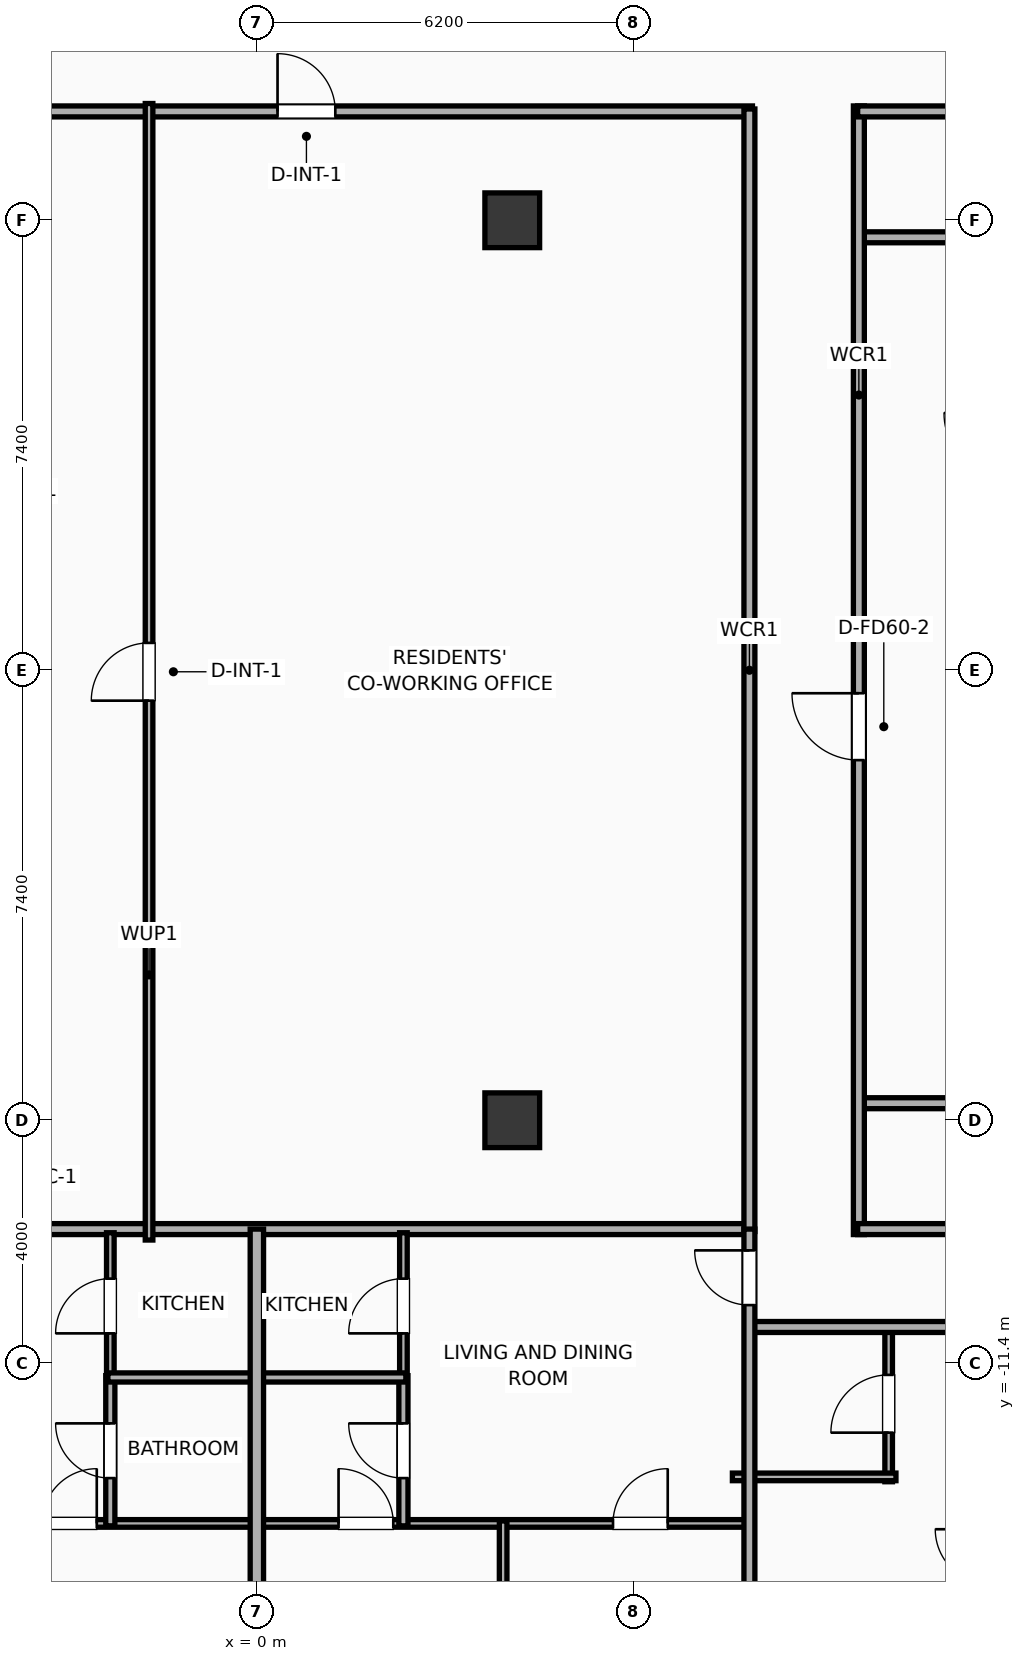
"""IFC4 building model, lengths in metres.
Left out: names, types, materials, properties, quantities, classifications, styles, units other than length and angle.
Written with IfcOpenShell. Run it as: python <this file> out.ifc"""

import sys

from ifc_helpers import new_model, si_unit, direction, frame, frame_2d, origin, origin_2d, place, context, subcontext, project, spatial, rectangle, extrude, element, fill, save


model = new_model("IFC4")
c1 = context("Model", 3, precision=1e-05, world=origin(), true_north=direction((0.0, 1.0)))
c2 = subcontext(c1, "Body", "Model", "MODEL_VIEW")
j1 = project(units=[si_unit("LENGTHUNIT", "METRE"), si_unit("PLANEANGLEUNIT", "RADIAN")], contexts=[c1])
p1 = place(None, origin())
s1 = spatial("IfcSite", under=j1, at=p1, CompositionType="ELEMENT")
p2 = place(p1, origin())
s2 = spatial("IfcBuilding", under=s1, at=p2, CompositionType="ELEMENT")
p3 = place(p2, frame((0.0, 0.0, 223.6)))
s3 = spatial("IfcBuildingStorey", under=s2, at=p3, CompositionType="ELEMENT", Elevation=223.6)
for number, where, z_axis, x_axis in (
    (1, (4.2, -7.4, 0.0), (0.0, 0.0, 1.0), (1.0, 0.0, 0.0)),
    (2, (4.2, 7.4, 0.0), (0.0, 0.0, 1.0), (1.0, 0.0, 0.0)),
):
    element("IfcColumn", number, at=place(p3, frame(where, z_axis=z_axis, x_axis=x_axis)), inside=s3, PredefinedType="COLUMN", context=c2, shape_type="SweptSolid", body=[
        extrude(rectangle(XDim=0.9, YDim=0.9, at=origin_2d()), origin(), (0.0, 0.0, 1.0), 3.9),
    ])
for number, where, z_axis, x_axis in (
    (3, (9.88, 7.12, 0.0), (0.0, 0.0, 1.0), (1.0, 0.0, 0.0)),
    (4, (9.88, -7.12, 0.0), (0.0, 0.0, 1.0), (1.0, 0.0, 0.0)),
):
    element("IfcWall", number, at=place(p3, frame(where, z_axis=z_axis, x_axis=x_axis)), inside=s3, PredefinedType="PARTITIONING", context=c2, shape_type="SweptSolid", body=[
        extrude(rectangle(XDim=2.27, YDim=0.18, at=frame_2d((1.135, 0.0))), origin(), (0.0, 0.0, 1.0), 3.65),
    ])
p4 = place(p3, frame((9.9, -9.28, 0.0), z_axis=(0.0, 0.0, 1.0), x_axis=(0.0, 1.0, 0.0)))
e5 = element("IfcWall", 5, at=p4, inside=s3, PredefinedType="PARTITIONING", context=c2, shape_type="SweptSolid", body=[
    extrude(rectangle(XDim=18.56, YDim=0.18, at=frame_2d((9.28, 0.0))), origin(), (0.0, 0.0, 1.0), 3.65),
])
p5 = place(p4, frame((7.802, 0.0, 0.0)))
e6 = element("IfcOpeningElement", 6, at=p5, cuts=e5, PredefinedType="OPENING", context=c2, shape_type="SweptSolid", body=[
    extrude(rectangle(XDim=1.1, YDim=2.05, at=frame_2d((0.55, 1.025))), frame((0.0, 0.1, 0.0), z_axis=(0.0, -1.0, 0.0), x_axis=(1.0, 0.0, 0.0)), (0.0, 0.0, 1.0), 0.2),
])
p6 = place(p3, frame((9.88, 9.19, 0.0), z_axis=(0.0, 0.0, 1.0), x_axis=(1.0, 0.0, 0.0)))
e7 = element("IfcWall", 7, at=p6, inside=s3, PredefinedType="PARTITIONING", context=c2, shape_type="SweptSolid", body=[
    extrude(rectangle(XDim=20.35, YDim=0.18, at=frame_2d((10.175, 0.0))), origin(), (0.0, 0.0, 1.0), 3.65),
])
p7 = place(p6, frame((15.149, 0.0, 0.0)))
e8 = element("IfcOpeningElement", 8, at=p7, cuts=e7, PredefinedType="OPENING", context=c2, shape_type="SweptSolid", body=[
    extrude(rectangle(XDim=1.15, YDim=2.05, at=frame_2d((0.575, 1.025))), frame((0.0, 0.1, 0.0), z_axis=(0.0, -1.0, 0.0), x_axis=(1.0, 0.0, 0.0)), (0.0, 0.0, 1.0), 0.2),
])
p8 = place(p3, frame((9.88, -9.19, 0.0), z_axis=(0.0, 0.0, 1.0), x_axis=(1.0, 0.0, 0.0)))
e9 = element("IfcWall", 9, at=p8, inside=s3, PredefinedType="PARTITIONING", context=c2, shape_type="SweptSolid", body=[
    extrude(rectangle(XDim=20.35, YDim=0.18, at=frame_2d((10.175, 0.0))), origin(), (0.0, 0.0, 1.0), 3.65),
])
p9 = place(p3, frame((-8.15, 9.19, 0.0), z_axis=(0.0, 0.0, 1.0), x_axis=(1.0, 0.0, 0.0)))
e10 = element("IfcWall", 10, at=p9, inside=s3, PredefinedType="PARTITIONING", context=c2, shape_type="SweptSolid", body=[
    extrude(rectangle(XDim=16.3, YDim=0.18, at=frame_2d((8.15, 0.0))), origin(), (0.0, 0.0, 1.0), 3.65),
])
p10 = place(p9, frame((8.49, 0.0, 0.0)))
e11 = element("IfcOpeningElement", 11, at=p10, cuts=e10, PredefinedType="OPENING", context=c2, shape_type="SweptSolid", body=[
    extrude(rectangle(XDim=0.95, YDim=2.05, at=frame_2d((0.475, 1.025))), frame((0.0, 0.1, 0.0), z_axis=(0.0, -1.0, 0.0), x_axis=(1.0, 0.0, 0.0)), (0.0, 0.0, 1.0), 0.2),
])
p11 = place(p3, frame((-8.15, -9.19, 0.0), z_axis=(0.0, 0.0, 1.0), x_axis=(1.0, 0.0, 0.0)))
e12 = element("IfcWall", 12, at=p11, inside=s3, PredefinedType="PARTITIONING", context=c2, shape_type="SweptSolid", body=[
    extrude(rectangle(XDim=16.3, YDim=0.18, at=frame_2d((8.15, 0.0))), origin(), (0.0, 0.0, 1.0), 3.65),
])
p12 = place(p3, frame((8.1, -9.23, 0.0), z_axis=(0.0, 0.0, 1.0), x_axis=(0.0, 1.0, 0.0)))
e13 = element("IfcWall", 13, at=p12, inside=s3, PredefinedType="PARTITIONING", context=c2, shape_type="SweptSolid", body=[
    extrude(rectangle(XDim=18.46, YDim=0.18, at=frame_2d((9.23, 0.0))), origin(), (0.0, 0.0, 1.0), 3.65),
])
p13 = place(p3, frame((-1.773, -9.37, 0.0), z_axis=(0.0, 0.0, 1.0), x_axis=(0.0, 1.0, 0.0)))
e14 = element("IfcWall", 14, at=p13, inside=s3, PredefinedType="PARTITIONING", context=c2, shape_type="SweptSolid", body=[
    extrude(rectangle(XDim=18.69, YDim=0.125, at=frame_2d((9.345, 0.0))), origin(), (0.0, 0.0, 1.0), 3.65),
])
p14 = place(p13, frame((8.87, 0.0, 0.0)))
e15 = element("IfcOpeningElement", 15, at=p14, cuts=e14, PredefinedType="OPENING", context=c2, shape_type="SweptSolid", body=[
    extrude(rectangle(XDim=0.95, YDim=2.05, at=frame_2d((0.475, 1.025))), frame((0.0, 0.073, 0.0), z_axis=(0.0, -1.0, 0.0), x_axis=(1.0, 0.0, 0.0)), (0.0, 0.0, 1.0), 0.145),
])
p15 = place(p3, frame((10.39, -13.345, 0.0), z_axis=(0.0, 0.0, 1.0), x_axis=(0.0, 1.0, 0.0)))
e16 = element("IfcWall", 16, at=p15, inside=s3, PredefinedType="PARTITIONING", context=c2, shape_type="SweptSolid", body=[
    extrude(rectangle(XDim=2.565, YDim=0.125, at=frame_2d((1.282, 0.0))), origin(), (0.0, 0.0, 1.0), 3.65),
])
p16 = place(p15, frame((0.808, 0.0, 0.0)))
e17 = element("IfcOpeningElement", 17, at=p16, cuts=e16, PredefinedType="OPENING", context=c2, shape_type="SweptSolid", body=[
    extrude(rectangle(XDim=0.95, YDim=2.05, at=frame_2d((0.475, 1.025))), frame((0.0, 0.073, 0.0), z_axis=(0.0, -1.0, 0.0), x_axis=(1.0, 0.0, 0.0)), (0.0, 0.0, 1.0), 0.145),
])
p17 = place(p3, frame((7.82, -13.265, 0.0), z_axis=(0.0, 0.0, 1.0), x_axis=(1.0, 0.0, 0.0)))
e18 = element("IfcWall", 18, at=p17, inside=s3, PredefinedType="PARTITIONING", context=c2, shape_type="SweptSolid", body=[
    extrude(rectangle(XDim=2.69, YDim=0.125, at=frame_2d((1.345, 0.0))), origin(), (0.0, 0.0, 1.0), 3.65),
])
p18 = place(p3, frame((8.08, -10.8, 0.0), z_axis=(0.0, 0.0, 1.0), x_axis=(1.0, 0.0, 0.0)))
e19 = element("IfcWall", 19, at=p18, inside=s3, PredefinedType="PARTITIONING", context=c2, shape_type="SweptSolid", body=[
    extrude(rectangle(XDim=22.15, YDim=0.18, at=frame_2d((11.075, 0.0))), origin(), (0.0, 0.0, 1.0), 3.65),
])
p19 = place(p18, frame((3.283, 0.0, 0.0)))
e20 = element("IfcOpeningElement", 20, at=p19, cuts=e19, PredefinedType="OPENING", context=c2, shape_type="SweptSolid", body=[
    extrude(rectangle(XDim=1.15, YDim=2.05, at=frame_2d((0.575, 1.025))), frame((0.0, 0.1, 0.0), z_axis=(0.0, -1.0, 0.0), x_axis=(1.0, 0.0, 0.0)), (0.0, 0.0, 1.0), 0.2),
])
p20 = place(p18, frame((9.229, 0.0, 0.0)))
e21 = element("IfcOpeningElement", 21, at=p20, cuts=e19, PredefinedType="OPENING", context=c2, shape_type="SweptSolid", body=[
    extrude(rectangle(XDim=1.15, YDim=2.05, at=frame_2d((0.575, 1.025))), frame((0.0, 0.1, 0.0), z_axis=(0.0, -1.0, 0.0), x_axis=(1.0, 0.0, 0.0)), (0.0, 0.0, 1.0), 0.2),
])
p21 = place(p18, frame((18.084, 0.0, 0.0)))
e22 = element("IfcOpeningElement", 22, at=p21, cuts=e19, PredefinedType="OPENING", context=c2, shape_type="SweptSolid", body=[
    extrude(rectangle(XDim=1.15, YDim=2.05, at=frame_2d((0.575, 1.025))), frame((0.0, 0.1, 0.0), z_axis=(0.0, -1.0, 0.0), x_axis=(1.0, 0.0, 0.0)), (0.0, 0.0, 1.0), 0.2),
])
p22 = place(p3, frame((-8.08, -14.03, 0.0), z_axis=(0.0, 0.0, 1.0), x_axis=(1.0, 0.0, 0.0)))
e23 = element("IfcWall", 23, at=p22, inside=s3, PredefinedType="PARTITIONING", context=c2, shape_type="SweptSolid", body=[
    extrude(rectangle(XDim=8.06, YDim=0.125, at=frame_2d((4.03, 0.0))), origin(), (0.0, 0.0, 1.0), 3.65),
])
p23 = place(p22, frame((1.323, 0.0, 0.0)))
e24 = element("IfcOpeningElement", 24, at=p23, cuts=e23, PredefinedType="OPENING", context=c2, shape_type="SweptSolid", body=[
    extrude(rectangle(XDim=0.9, YDim=2.05, at=frame_2d((0.45, 1.025))), frame((0.0, 0.073, 0.0), z_axis=(0.0, -1.0, 0.0), x_axis=(1.0, 0.0, 0.0)), (0.0, 0.0, 1.0), 0.145),
])
p24 = place(p22, frame((4.547, 0.0, 0.0)))
e25 = element("IfcOpeningElement", 25, at=p24, cuts=e23, PredefinedType="OPENING", context=c2, shape_type="SweptSolid", body=[
    extrude(rectangle(XDim=0.9, YDim=2.05, at=frame_2d((0.45, 1.025))), frame((0.0, 0.073, 0.0), z_axis=(0.0, -1.0, 0.0), x_axis=(1.0, 0.0, 0.0)), (0.0, 0.0, 1.0), 0.145),
])
p25 = place(p3, frame((-2.41, -11.66, 0.0), z_axis=(0.0, 0.0, 1.0), x_axis=(0.0, 1.0, 0.0)))
e26 = element("IfcWall", 26, at=p25, inside=s3, PredefinedType="PARTITIONING", context=c2, shape_type="SweptSolid", body=[
    extrude(rectangle(XDim=2.41, YDim=0.125, at=frame_2d((1.205, 0.0))), origin(), (0.0, 0.0, 1.0), 3.65),
])
p26 = place(p25, frame((0.755, 0.0, 0.0)))
e27 = element("IfcOpeningElement", 27, at=p26, cuts=e26, PredefinedType="OPENING", context=c2, shape_type="SweptSolid", body=[
    extrude(rectangle(XDim=0.9, YDim=2.05, at=frame_2d((0.45, 1.025))), frame((0.0, 0.073, 0.0), z_axis=(0.0, -1.0, 0.0), x_axis=(1.0, 0.0, 0.0)), (0.0, 0.0, 1.0), 0.145),
])
p27 = place(p3, frame((-2.41, -14.07, 0.0), z_axis=(0.0, 0.0, 1.0), x_axis=(0.0, 1.0, 0.0)))
e28 = element("IfcWall", 28, at=p27, inside=s3, PredefinedType="PLUMBINGWALL", context=c2, shape_type="SweptSolid", body=[
    extrude(rectangle(XDim=2.47, YDim=0.15, at=frame_2d((1.235, 0.0))), origin(), (0.0, 0.0, 1.0), 3.65),
])
p28 = place(p27, frame((0.785, 0.0, 0.0)))
e29 = element("IfcOpeningElement", 29, at=p28, cuts=e28, PredefinedType="OPENING", context=c2, shape_type="SweptSolid", body=[
    extrude(rectangle(XDim=0.9, YDim=2.05, at=frame_2d((0.45, 1.025))), frame((0.0, 0.085, 0.0), z_axis=(0.0, -1.0, 0.0), x_axis=(1.0, 0.0, 0.0)), (0.0, 0.0, 1.0), 0.17),
])
p29 = place(p3, frame((-2.45, -11.63, 0.0), z_axis=(0.0, 0.0, 1.0), x_axis=(1.0, 0.0, 0.0)))
e30 = element("IfcWall", 30, at=p29, inside=s3, PredefinedType="PLUMBINGWALL", context=c2, shape_type="SweptSolid", body=[
    extrude(rectangle(XDim=2.43, YDim=0.15, at=frame_2d((1.215, 0.0))), origin(), (0.0, 0.0, 1.0), 3.65),
])
p30 = place(p3, frame((0.02, -14.03, 0.0), z_axis=(0.0, 0.0, 1.0), x_axis=(1.0, 0.0, 0.0)))
e31 = element("IfcWall", 31, at=p30, inside=s3, PredefinedType="PARTITIONING", context=c2, shape_type="SweptSolid", body=[
    extrude(rectangle(XDim=8.06, YDim=0.125, at=frame_2d((4.03, 0.0))), origin(), (0.0, 0.0, 1.0), 3.65),
])
p31 = place(p30, frame((1.323, 0.0, 0.0)))
e32 = element("IfcOpeningElement", 32, at=p31, cuts=e31, PredefinedType="OPENING", context=c2, shape_type="SweptSolid", body=[
    extrude(rectangle(XDim=0.9, YDim=2.05, at=frame_2d((0.45, 1.025))), frame((0.0, 0.073, 0.0), z_axis=(0.0, -1.0, 0.0), x_axis=(1.0, 0.0, 0.0)), (0.0, 0.0, 1.0), 0.145),
])
p32 = place(p30, frame((5.837, 0.0, 0.0)))
e33 = element("IfcOpeningElement", 33, at=p32, cuts=e31, PredefinedType="OPENING", context=c2, shape_type="SweptSolid", body=[
    extrude(rectangle(XDim=0.9, YDim=2.05, at=frame_2d((0.45, 1.025))), frame((0.0, 0.073, 0.0), z_axis=(0.0, -1.0, 0.0), x_axis=(1.0, 0.0, 0.0)), (0.0, 0.0, 1.0), 0.145),
])
p33 = place(p3, frame((2.41, -11.66, 0.0), z_axis=(0.0, 0.0, 1.0), x_axis=(0.0, 1.0, 0.0)))
e34 = element("IfcWall", 34, at=p33, inside=s3, PredefinedType="PARTITIONING", context=c2, shape_type="SweptSolid", body=[
    extrude(rectangle(XDim=2.41, YDim=0.125, at=frame_2d((1.205, 0.0))), origin(), (0.0, 0.0, 1.0), 3.65),
])
p34 = place(p33, frame((0.755, 0.0, 0.0)))
e35 = element("IfcOpeningElement", 35, at=p34, cuts=e34, PredefinedType="OPENING", context=c2, shape_type="SweptSolid", body=[
    extrude(rectangle(XDim=0.9, YDim=2.05, at=frame_2d((0.45, 1.025))), frame((0.0, 0.073, 0.0), z_axis=(0.0, -1.0, 0.0), x_axis=(1.0, 0.0, 0.0)), (0.0, 0.0, 1.0), 0.145),
])
p35 = place(p3, frame((2.41, -14.07, 0.0), z_axis=(0.0, 0.0, 1.0), x_axis=(0.0, 1.0, 0.0)))
e36 = element("IfcWall", 36, at=p35, inside=s3, PredefinedType="PLUMBINGWALL", context=c2, shape_type="SweptSolid", body=[
    extrude(rectangle(XDim=2.47, YDim=0.15, at=frame_2d((1.235, 0.0))), origin(), (0.0, 0.0, 1.0), 3.65),
])
p36 = place(p35, frame((0.785, 0.0, 0.0)))
e37 = element("IfcOpeningElement", 37, at=p36, cuts=e36, PredefinedType="OPENING", context=c2, shape_type="SweptSolid", body=[
    extrude(rectangle(XDim=0.9, YDim=2.05, at=frame_2d((0.45, 1.025))), frame((0.0, 0.085, 0.0), z_axis=(0.0, -1.0, 0.0), x_axis=(1.0, 0.0, 0.0)), (0.0, 0.0, 1.0), 0.17),
])
p37 = place(p3, frame((0.02, -11.63, 0.0), z_axis=(0.0, 0.0, 1.0), x_axis=(1.0, 0.0, 0.0)))
e38 = element("IfcWall", 38, at=p37, inside=s3, PredefinedType="PLUMBINGWALL", context=c2, shape_type="SweptSolid", body=[
    extrude(rectangle(XDim=2.43, YDim=0.15, at=frame_2d((1.215, 0.0))), origin(), (0.0, 0.0, 1.0), 3.65),
])
p38 = place(p3, frame((4.05, -18.83, 0.0), z_axis=(0.0, 0.0, 1.0), x_axis=(0.0, 1.0, 0.0)))
e39 = element("IfcWall", 39, at=p38, inside=s3, PredefinedType="PARTITIONING", context=c2, shape_type="SweptSolid", body=[
    extrude(rectangle(XDim=4.84, YDim=0.125, at=frame_2d((2.42, 0.0))), origin(), (0.0, 0.0, 1.0), 3.65),
])
p39 = place(p3, frame((8.1, -18.83, 0.0), z_axis=(0.0, 0.0, 1.0), x_axis=(0.0, 1.0, 0.0)))
e40 = element("IfcWall", 40, at=p39, inside=s3, PredefinedType="PARTITIONING", context=c2, shape_type="SweptSolid", body=[
    extrude(rectangle(XDim=9.64, YDim=0.18, at=frame_2d((4.82, 0.0))), origin(), (0.0, 0.0, 1.0), 3.65),
])
p40 = place(p39, frame((8.39, 0.0, 0.0)))
e41 = element("IfcOpeningElement", 41, at=p40, cuts=e40, PredefinedType="OPENING", context=c2, shape_type="SweptSolid", body=[
    extrude(rectangle(XDim=0.9, YDim=2.05, at=frame_2d((0.45, 1.025))), frame((0.0, 0.1, 0.0), z_axis=(0.0, -1.0, 0.0), x_axis=(1.0, 0.0, 0.0)), (0.0, 0.0, 1.0), 0.2),
])
p41 = place(p3, frame((0.0, -18.83, 0.0), z_axis=(0.0, 0.0, 1.0), x_axis=(0.0, 1.0, 0.0)))
e42 = element("IfcWall", 42, at=p41, inside=s3, PredefinedType="PARTITIONING", context=c2, shape_type="SweptSolid", body=[
    extrude(rectangle(XDim=9.64, YDim=0.22, at=frame_2d((4.82, 0.0))), origin(), (0.0, 0.0, 1.0), 3.65),
])
p42 = place(p5, origin())
e43 = element("IfcDoor", 43, at=p42, inside=s3, OperationType="SINGLE_SWING_RIGHT", PredefinedType="DOOR", context=c2, shape_type="SweptSolid", body=[
    extrude(rectangle(XDim=1.1, YDim=2.05, at=frame_2d((0.55, 1.025))), frame((0.0, 0.025, 0.0), z_axis=(0.0, -1.0, 0.0), x_axis=(1.0, 0.0, 0.0)), (0.0, 0.0, 1.0), 0.05),
])
fill(e6, e43)
p43 = place(p10, origin())
e44 = element("IfcDoor", 44, at=p43, inside=s3, OperationType="SINGLE_SWING_LEFT", PredefinedType="DOOR", context=c2, shape_type="SweptSolid", body=[
    extrude(rectangle(XDim=0.95, YDim=2.05, at=frame_2d((0.475, 1.025))), frame((0.0, 0.025, 0.0), z_axis=(0.0, -1.0, 0.0), x_axis=(1.0, 0.0, 0.0)), (0.0, 0.0, 1.0), 0.05),
])
fill(e11, e44)
p44 = place(p14, origin())
e45 = element("IfcDoor", 45, at=p44, inside=s3, OperationType="SINGLE_SWING_LEFT", PredefinedType="DOOR", context=c2, shape_type="SweptSolid", body=[
    extrude(rectangle(XDim=0.95, YDim=2.05, at=frame_2d((0.475, 1.025))), frame((0.0, 0.025, 0.0), z_axis=(0.0, -1.0, 0.0), x_axis=(1.0, 0.0, 0.0)), (0.0, 0.0, 1.0), 0.05),
])
fill(e15, e45)
p45 = place(p16, origin())
e46 = element("IfcDoor", 46, at=p45, inside=s3, OperationType="SINGLE_SWING_LEFT", PredefinedType="DOOR", context=c2, shape_type="SweptSolid", body=[
    extrude(rectangle(XDim=0.95, YDim=2.05, at=frame_2d((0.475, 1.025))), frame((0.0, 0.025, 0.0), z_axis=(0.0, -1.0, 0.0), x_axis=(1.0, 0.0, 0.0)), (0.0, 0.0, 1.0), 0.05),
])
fill(e17, e46)
p46 = place(p24, origin())
e47 = element("IfcDoor", 47, at=p46, inside=s3, OperationType="SINGLE_SWING_RIGHT", PredefinedType="DOOR", context=c2, shape_type="SweptSolid", body=[
    extrude(rectangle(XDim=0.9, YDim=2.05, at=frame_2d((0.45, 1.025))), frame((0.0, 0.025, 0.0), z_axis=(0.0, -1.0, 0.0), x_axis=(1.0, 0.0, 0.0)), (0.0, 0.0, 1.0), 0.05),
])
fill(e25, e47)
p47 = place(p26, origin())
e48 = element("IfcDoor", 48, at=p47, inside=s3, OperationType="SINGLE_SWING_LEFT", PredefinedType="DOOR", context=c2, shape_type="SweptSolid", body=[
    extrude(rectangle(XDim=0.9, YDim=2.05, at=frame_2d((0.45, 1.025))), frame((0.0, 0.025, 0.0), z_axis=(0.0, -1.0, 0.0), x_axis=(1.0, 0.0, 0.0)), (0.0, 0.0, 1.0), 0.05),
])
fill(e27, e48)
p48 = place(p28, origin())
e49 = element("IfcDoor", 49, at=p48, inside=s3, OperationType="SINGLE_SWING_RIGHT", PredefinedType="DOOR", context=c2, shape_type="SweptSolid", body=[
    extrude(rectangle(XDim=0.9, YDim=2.05, at=frame_2d((0.45, 1.025))), frame((0.0, 0.025, 0.0), z_axis=(0.0, -1.0, 0.0), x_axis=(1.0, 0.0, 0.0)), (0.0, 0.0, 1.0), 0.05),
])
fill(e29, e49)
p49 = place(p31, origin())
e50 = element("IfcDoor", 50, at=p49, inside=s3, OperationType="SINGLE_SWING_LEFT", PredefinedType="DOOR", context=c2, shape_type="SweptSolid", body=[
    extrude(rectangle(XDim=0.9, YDim=2.05, at=frame_2d((0.45, 1.025))), frame((0.0, 0.025, 0.0), z_axis=(0.0, -1.0, 0.0), x_axis=(1.0, 0.0, 0.0)), (0.0, 0.0, 1.0), 0.05),
])
fill(e32, e50)
p50 = place(p32, origin())
e51 = element("IfcDoor", 51, at=p50, inside=s3, OperationType="SINGLE_SWING_RIGHT", PredefinedType="DOOR", context=c2, shape_type="SweptSolid", body=[
    extrude(rectangle(XDim=0.9, YDim=2.05, at=frame_2d((0.45, 1.025))), frame((0.0, 0.025, 0.0), z_axis=(0.0, -1.0, 0.0), x_axis=(1.0, 0.0, 0.0)), (0.0, 0.0, 1.0), 0.05),
])
fill(e33, e51)
p51 = place(p34, origin())
e52 = element("IfcDoor", 52, at=p51, inside=s3, OperationType="SINGLE_SWING_LEFT", PredefinedType="DOOR", context=c2, shape_type="SweptSolid", body=[
    extrude(rectangle(XDim=0.9, YDim=2.05, at=frame_2d((0.45, 1.025))), frame((0.0, 0.025, 0.0), z_axis=(0.0, -1.0, 0.0), x_axis=(1.0, 0.0, 0.0)), (0.0, 0.0, 1.0), 0.05),
])
fill(e35, e52)
p52 = place(p36, origin())
e53 = element("IfcDoor", 53, at=p52, inside=s3, OperationType="SINGLE_SWING_RIGHT", PredefinedType="DOOR", context=c2, shape_type="SweptSolid", body=[
    extrude(rectangle(XDim=0.9, YDim=2.05, at=frame_2d((0.45, 1.025))), frame((0.0, 0.025, 0.0), z_axis=(0.0, -1.0, 0.0), x_axis=(1.0, 0.0, 0.0)), (0.0, 0.0, 1.0), 0.05),
])
fill(e37, e53)
p53 = place(p40, origin())
e54 = element("IfcDoor", 54, at=p53, inside=s3, OperationType="SINGLE_SWING_RIGHT", PredefinedType="DOOR", context=c2, shape_type="SweptSolid", body=[
    extrude(rectangle(XDim=0.9, YDim=2.05, at=frame_2d((0.45, 1.025))), frame((0.0, 0.025, 0.0), z_axis=(0.0, -1.0, 0.0), x_axis=(1.0, 0.0, 0.0)), (0.0, 0.0, 1.0), 0.05),
])
fill(e41, e54)
save(model, sys.argv[1])
